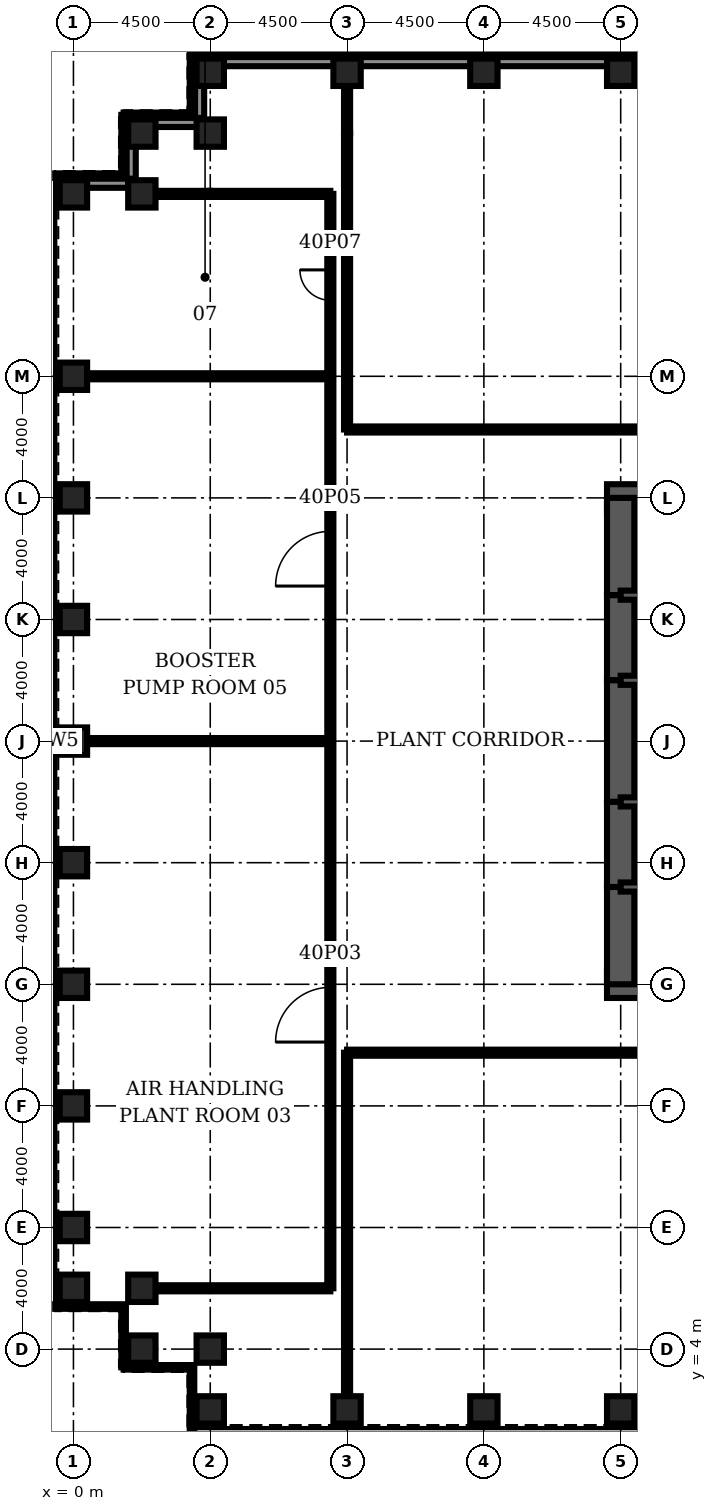
"""IFC4 building model, lengths in metres.
Left out: names, types, materials, properties, quantities, classifications, styles, units other than length and angle.
Written with IfcOpenShell. Run it as: python <this file> out.ifc"""

import sys

from ifc_helpers import new_model, si_unit, direction, frame, frame_2d, origin, origin_2d, place, context, subcontext, project, spatial, rectangle, hollow_rectangle, extrude, element, fill, save


model = new_model("IFC4")
c1 = context("Model", 3, precision=1e-05, world=origin(), true_north=direction((0.0, 1.0)))
c2 = subcontext(c1, "Body", "Model", "MODEL_VIEW")
j1 = project(units=[si_unit("LENGTHUNIT", "METRE"), si_unit("PLANEANGLEUNIT", "RADIAN")], contexts=[c1])
p1 = place(None, origin())
s1 = spatial("IfcSite", under=j1, at=p1, CompositionType="ELEMENT")
p2 = place(p1, origin())
s2 = spatial("IfcBuilding", under=s1, at=p2, CompositionType="ELEMENT")
p3 = place(p2, frame((0.0, 0.0, 180.3)))
s3 = spatial("IfcBuildingStorey", under=s2, at=p3, CompositionType="ELEMENT", Elevation=180.3)
for number, where, z_axis, x_axis in (
    (1, (4.5, 2.0, 0.0), (0.0, 0.0, 1.0), (0.0, 1.0, 0.0)),
    (2, (9.0, 2.0, 0.0), (0.0, 0.0, 1.0), (0.0, 1.0, 0.0)),
    (3, (13.5, 2.0, 0.0), (0.0, 0.0, 1.0), (0.0, 1.0, 0.0)),
    (4, (18.0, 2.0, 0.0), (0.0, 0.0, 1.0), (0.0, 1.0, 0.0)),
):
    element("IfcColumn", number, at=place(p3, frame(where, z_axis=z_axis, x_axis=x_axis)), inside=s3, PredefinedType="COLUMN", context=c2, shape_type="SweptSolid", body=[
        extrude(hollow_rectangle(XDim=0.9, YDim=0.9, WallThickness=0.09, at=origin_2d()), origin(), (0.0, 0.0, 1.0), 5.5),
    ])
for number, where, z_axis, x_axis in (
    (5, (18.0, 45.944, 0.155), (0.0, -0.342, 0.94), (0.0, 0.94, 0.342)),
    (6, (13.5, 45.944, 0.155), (0.0, -0.342, 0.94), (0.0, 0.94, 0.342)),
    (7, (9.0, 45.944, 0.155), (0.0, -0.342, 0.94), (0.0, 0.94, 0.342)),
    (8, (4.5, 45.944, 0.155), (0.0, -0.342, 0.94), (0.0, 0.94, 0.342)),
    (9, (4.5, 43.944, 0.155), (0.0, -0.342, 0.94), (0.0, 0.94, 0.342)),
    (10, (2.25, 43.944, 0.155), (0.0, -0.342, 0.94), (1.0, 0.0, 0.0)),
    (11, (2.25, 41.944, 0.155), (0.0, -0.342, 0.94), (1.0, 0.0, 0.0)),
    (12, (0.0, 41.944, 0.155), (0.0, -0.342, 0.94), (1.0, 0.0, 0.0)),
):
    element("IfcColumn", number, at=place(p3, frame(where, z_axis=z_axis, x_axis=x_axis)), inside=s3, PredefinedType="USERDEFINED", context=c2, shape_type="SweptSolid", body=[
        extrude(hollow_rectangle(XDim=0.9, YDim=0.9, WallThickness=0.09, at=origin_2d()), origin(), (0.0, 0.0, 1.0), 5.522),
    ])
for number, where, z_axis, x_axis in (
    (13, (0.0, 36.0, 0.0), (0.0, 0.0, 1.0), (1.0, 0.0, 0.0)),
    (14, (0.0, 32.0, 0.0), (0.0, 0.0, 1.0), (1.0, 0.0, 0.0)),
    (15, (0.0, 28.0, 0.0), (0.0, 0.0, 1.0), (1.0, 0.0, 0.0)),
    (16, (0.0, 24.0, 0.0), (0.0, 0.0, 1.0), (1.0, 0.0, 0.0)),
    (17, (0.0, 20.0, 0.0), (0.0, 0.0, 1.0), (1.0, 0.0, 0.0)),
    (18, (0.0, 16.0, 0.0), (0.0, 0.0, 1.0), (1.0, 0.0, 0.0)),
    (19, (0.0, 12.0, 0.0), (0.0, 0.0, 1.0), (1.0, 0.0, 0.0)),
    (20, (0.0, 8.0, 0.0), (0.0, 0.0, 1.0), (1.0, 0.0, 0.0)),
    (21, (0.0, 6.0, 0.0), (0.0, 0.0, 1.0), (1.0, 0.0, 0.0)),
    (22, (2.25, 6.0, 0.0), (0.0, 0.0, 1.0), (1.0, 0.0, 0.0)),
    (23, (2.25, 4.0, 0.0), (0.0, 0.0, 1.0), (1.0, 0.0, 0.0)),
    (24, (4.5, 4.0, 0.0), (0.0, 0.0, 1.0), (0.0, 1.0, 0.0)),
):
    element("IfcColumn", number, at=place(p3, frame(where, z_axis=z_axis, x_axis=x_axis)), inside=s3, PredefinedType="COLUMN", context=c2, shape_type="SweptSolid", body=[
        extrude(hollow_rectangle(XDim=0.9, YDim=0.9, WallThickness=0.09, at=origin_2d()), origin(), (0.0, 0.0, 1.0), 5.5),
    ])
for number, where, z_axis, x_axis in (
    (25, (17.55, 16.0, 0.0), (0.0, 0.0, 1.0), (1.0, 0.0, 0.0)),
    (26, (27.0, 32.0, 0.0), (0.0, 0.0, 1.0), (-1.0, 0.0, 0.0)),
):
    element("IfcWall", number, at=place(p3, frame(where, z_axis=z_axis, x_axis=x_axis)), inside=s3, PredefinedType="SHEAR", context=c2, shape_type="SweptSolid", body=[
        extrude(rectangle(XDim=9.45, YDim=0.9, at=frame_2d((4.725, 0.0))), origin(), (0.0, 0.0, 1.0), 5.5),
    ])
p4 = place(p3, frame((18.0, 32.0, 0.0), z_axis=(0.0, 0.0, 1.0), x_axis=(0.0, -1.0, 0.0)))
e27 = element("IfcWall", 27, at=p4, inside=s3, PredefinedType="SHEAR", context=c2, shape_type="SweptSolid", body=[
    extrude(rectangle(XDim=3.2, YDim=0.9, at=frame_2d((1.6, 0.0))), origin(), (0.0, 0.0, 1.0), 5.5),
])
p5 = place(p3, frame((18.0, 28.8, 0.0), z_axis=(0.0, 0.0, 1.0), x_axis=(0.0, -1.0, 0.0)))
e28 = element("IfcWall", 28, at=p5, inside=s3, PredefinedType="SHEAR", context=c2, shape_type="SweptSolid", body=[
    extrude(rectangle(XDim=2.8, YDim=0.9, at=frame_2d((1.4, 0.0))), origin(), (0.0, 0.0, 1.0), 5.5),
])
p6 = place(p5, frame((0.4, 0.0, 0.0)))
e29 = element("IfcOpeningElement", 29, at=p6, cuts=e28, PredefinedType="OPENING", context=c2, shape_type="SweptSolid", body=[
    extrude(rectangle(XDim=1.8, YDim=2.1, at=frame_2d((0.9, 1.05))), frame((0.0, 0.46, 0.0), z_axis=(0.0, -1.0, 0.0), x_axis=(1.0, 0.0, 0.0)), (0.0, 0.0, 1.0), 0.92),
])
p7 = place(p3, frame((18.0, 26.0, 0.0), z_axis=(0.0, 0.0, 1.0), x_axis=(0.0, -1.0, 0.0)))
e30 = element("IfcWall", 30, at=p7, inside=s3, PredefinedType="SHEAR", context=c2, shape_type="SweptSolid", body=[
    extrude(rectangle(XDim=4.0, YDim=0.9, at=frame_2d((2.0, 0.0))), origin(), (0.0, 0.0, 1.0), 5.5),
])
p8 = place(p3, frame((18.0, 22.0, 0.0), z_axis=(0.0, 0.0, 1.0), x_axis=(0.0, -1.0, 0.0)))
e31 = element("IfcWall", 31, at=p8, inside=s3, PredefinedType="SHEAR", context=c2, shape_type="SweptSolid", body=[
    extrude(rectangle(XDim=2.8, YDim=0.9, at=frame_2d((1.4, 0.0))), origin(), (0.0, 0.0, 1.0), 5.5),
])
p9 = place(p8, frame((0.6, 0.0, 0.0)))
e32 = element("IfcOpeningElement", 32, at=p9, cuts=e31, PredefinedType="OPENING", context=c2, shape_type="SweptSolid", body=[
    extrude(rectangle(XDim=1.8, YDim=2.1, at=frame_2d((0.9, 1.05))), frame((0.0, 0.46, 0.0), z_axis=(0.0, -1.0, 0.0), x_axis=(1.0, 0.0, 0.0)), (0.0, 0.0, 1.0), 0.92),
])
p10 = place(p3, frame((18.0, 19.2, 0.0), z_axis=(0.0, 0.0, 1.0), x_axis=(0.0, -1.0, 0.0)))
e33 = element("IfcWall", 33, at=p10, inside=s3, PredefinedType="SHEAR", context=c2, shape_type="SweptSolid", body=[
    extrude(rectangle(XDim=3.2, YDim=0.9, at=frame_2d((1.6, 0.0))), origin(), (0.0, 0.0, 1.0), 5.5),
])
p11 = place(p3, frame((18.0, 19.2, 0.0), z_axis=(0.0, 0.0, 1.0), x_axis=(1.0, 0.0, 0.0)))
e34 = element("IfcWall", 34, at=p11, inside=s3, PredefinedType="SOLIDWALL", context=c2, shape_type="SweptSolid", body=[
    extrude(rectangle(XDim=9.0, YDim=0.3, at=frame_2d((4.5, 0.0))), origin(), (0.0, 0.0, 1.0), 5.5),
])
p12 = place(p11, frame((0.65, 0.0, 0.0)))
e35 = element("IfcOpeningElement", 35, at=p12, cuts=e34, PredefinedType="OPENING", context=c2, shape_type="SweptSolid", body=[
    extrude(rectangle(XDim=1.0, YDim=2.1, at=frame_2d((0.5, 1.05))), frame((0.0, 0.16, 0.0), z_axis=(0.0, -1.0, 0.0), x_axis=(1.0, 0.0, 0.0)), (0.0, 0.0, 1.0), 0.32),
])
p13 = place(p3, frame((18.0, 28.8, 0.0), z_axis=(0.0, 0.0, 1.0), x_axis=(1.0, 0.0, 0.0)))
e36 = element("IfcWall", 36, at=p13, inside=s3, PredefinedType="SOLIDWALL", context=c2, shape_type="SweptSolid", body=[
    extrude(rectangle(XDim=9.0, YDim=0.3, at=frame_2d((4.5, 0.0))), origin(), (0.0, 0.0, 1.0), 5.5),
])
p14 = place(p13, frame((0.65, 0.0, 0.0)))
e37 = element("IfcOpeningElement", 37, at=p14, cuts=e36, PredefinedType="OPENING", context=c2, shape_type="SweptSolid", body=[
    extrude(rectangle(XDim=1.0, YDim=2.1, at=frame_2d((0.5, 1.05))), frame((0.0, 0.16, 0.0), z_axis=(0.0, -1.0, 0.0), x_axis=(1.0, 0.0, 0.0)), (0.0, 0.0, 1.0), 0.32),
])
p15 = place(p3, frame((18.0, 22.0, 0.0), z_axis=(0.0, 0.0, 1.0), x_axis=(1.0, 0.0, 0.0)))
e38 = element("IfcWall", 38, at=p15, inside=s3, PredefinedType="SOLIDWALL", context=c2, shape_type="SweptSolid", body=[
    extrude(rectangle(XDim=6.0, YDim=0.3, at=frame_2d((3.0, 0.0))), origin(), (0.0, 0.0, 1.0), 5.5),
])
p16 = place(p15, frame((2.0, 0.0, 0.0)))
e39 = element("IfcOpeningElement", 39, at=p16, cuts=e38, PredefinedType="OPENING", context=c2, shape_type="SweptSolid", body=[
    extrude(rectangle(XDim=1.0, YDim=2.1, at=frame_2d((0.5, 1.05))), frame((0.0, 0.16, 0.0), z_axis=(0.0, -1.0, 0.0), x_axis=(1.0, 0.0, 0.0)), (0.0, 0.0, 1.0), 0.32),
])
p17 = place(p3, frame((18.0, 26.0, 0.0), z_axis=(0.0, 0.0, 1.0), x_axis=(1.0, 0.0, 0.0)))
e40 = element("IfcWall", 40, at=p17, inside=s3, PredefinedType="SOLIDWALL", context=c2, shape_type="SweptSolid", body=[
    extrude(rectangle(XDim=6.0, YDim=0.3, at=frame_2d((3.0, 0.0))), origin(), (0.0, 0.0, 1.0), 5.5),
])
p18 = place(p3, frame((2.7, 6.0, 0.0), z_axis=(0.0, 0.0, 1.0), x_axis=(1.0, 0.0, 0.0)))
e41 = element("IfcWall", 41, at=p18, inside=s3, PredefinedType="PARTITIONING", context=c2, shape_type="SweptSolid", body=[
    extrude(rectangle(XDim=5.75, YDim=0.2, at=frame_2d((2.875, 0.0))), origin(), (0.0, 0.0, 1.0), 5.34),
])
p19 = place(p3, frame((9.0, 13.75, 0.0), z_axis=(0.0, 0.0, 1.0), x_axis=(1.0, 0.0, 0.0)))
e42 = element("IfcWall", 42, at=p19, inside=s3, PredefinedType="PARTITIONING", context=c2, shape_type="SweptSolid", body=[
    extrude(rectangle(XDim=54.0, YDim=0.2, at=frame_2d((27.0, 0.0))), origin(), (0.0, 0.0, 1.0), 5.34),
])
p20 = place(p19, frame((26.1, 0.0, 0.0)))
e43 = element("IfcOpeningElement", 43, at=p20, cuts=e42, PredefinedType="OPENING", context=c2, shape_type="SweptSolid", body=[
    extrude(rectangle(XDim=1.8, YDim=2.1, at=frame_2d((0.9, 1.05))), frame((0.0, 0.11, 0.0), z_axis=(0.0, -1.0, 0.0), x_axis=(1.0, 0.0, 0.0)), (0.0, 0.0, 1.0), 0.22),
])
p21 = place(p3, frame((0.45, 24.0, 0.0), z_axis=(0.0, 0.0, 1.0), x_axis=(1.0, 0.0, 0.0)))
e44 = element("IfcWall", 44, at=p21, inside=s3, PredefinedType="PARTITIONING", context=c2, shape_type="SweptSolid", body=[
    extrude(rectangle(XDim=8.0, YDim=0.2, at=frame_2d((4.0, 0.0))), origin(), (0.0, 0.0, 1.0), 5.34),
])
p22 = place(p3, frame((9.0, 34.25, 0.0), z_axis=(0.0, 0.0, 1.0), x_axis=(1.0, 0.0, 0.0)))
e45 = element("IfcWall", 45, at=p22, inside=s3, PredefinedType="PARTITIONING", context=c2, shape_type="SweptSolid", body=[
    extrude(rectangle(XDim=54.0, YDim=0.2, at=frame_2d((27.0, 0.0))), origin(), (0.0, 0.0, 1.0), 5.34),
])
p23 = place(p22, frame((26.1, 0.0, 0.0)))
e46 = element("IfcOpeningElement", 46, at=p23, cuts=e45, PredefinedType="OPENING", context=c2, shape_type="SweptSolid", body=[
    extrude(rectangle(XDim=1.8, YDim=2.1, at=frame_2d((0.9, 1.05))), frame((0.0, 0.11, 0.0), z_axis=(0.0, -1.0, 0.0), x_axis=(1.0, 0.0, 0.0)), (0.0, 0.0, 1.0), 0.22),
])
p24 = place(p3, frame((0.45, 36.0, 0.0), z_axis=(0.0, 0.0, 1.0), x_axis=(1.0, 0.0, 0.0)))
e47 = element("IfcWall", 47, at=p24, inside=s3, PredefinedType="PARTITIONING", context=c2, shape_type="SweptSolid", body=[
    extrude(rectangle(XDim=8.0, YDim=0.2, at=frame_2d((4.0, 0.0))), origin(), (0.0, 0.0, 1.0), 5.34),
])
p25 = place(p3, frame((2.7, 42.0, 0.0), z_axis=(0.0, 0.0, 1.0), x_axis=(1.0, 0.0, 0.0)))
e48 = element("IfcWall", 48, at=p25, inside=s3, PredefinedType="PARTITIONING", context=c2, shape_type="SweptSolid", body=[
    extrude(rectangle(XDim=1.8, YDim=0.2, at=frame_2d((0.9, 0.0))), origin(), (0.0, 0.0, 1.0), 4.64),
])
p26 = place(p3, frame((4.5, 42.0, 0.0), z_axis=(0.0, 0.0, 1.0), x_axis=(1.0, 0.0, 0.0)))
e49 = element("IfcWall", 49, at=p26, inside=s3, PredefinedType="PARTITIONING", context=c2, shape_type="SweptSolid", body=[
    extrude(rectangle(XDim=3.95, YDim=0.2, at=frame_2d((1.975, 0.0))), origin(), (0.0, 0.0, 1.0), 5.34),
])
p27 = place(p3, frame((8.45, 6.0, 0.0), z_axis=(0.0, 0.0, 1.0), x_axis=(0.0, 1.0, 0.0)))
e50 = element("IfcWall", 50, at=p27, inside=s3, PredefinedType="PARTITIONING", context=c2, shape_type="SweptSolid", body=[
    extrude(rectangle(XDim=36.0, YDim=0.2, at=frame_2d((18.0, 0.0))), origin(), (0.0, 0.0, 1.0), 5.34),
])
p28 = place(p27, frame((8.1, 0.0, 0.0)))
e51 = element("IfcOpeningElement", 51, at=p28, cuts=e50, PredefinedType="OPENING", context=c2, shape_type="SweptSolid", body=[
    extrude(rectangle(XDim=1.8, YDim=2.1, at=frame_2d((0.9, 1.05))), frame((0.0, 0.11, 0.0), z_axis=(0.0, -1.0, 0.0), x_axis=(1.0, 0.0, 0.0)), (0.0, 0.0, 1.0), 0.22),
])
p29 = place(p27, frame((23.1, 0.0, 0.0)))
e52 = element("IfcOpeningElement", 52, at=p29, cuts=e50, PredefinedType="OPENING", context=c2, shape_type="SweptSolid", body=[
    extrude(rectangle(XDim=1.8, YDim=2.1, at=frame_2d((0.9, 1.05))), frame((0.0, 0.11, 0.0), z_axis=(0.0, -1.0, 0.0), x_axis=(1.0, 0.0, 0.0)), (0.0, 0.0, 1.0), 0.22),
])
p30 = place(p27, frame((32.5, 0.0, 0.0)))
e53 = element("IfcOpeningElement", 53, at=p30, cuts=e50, PredefinedType="OPENING", context=c2, shape_type="SweptSolid", body=[
    extrude(rectangle(XDim=1.0, YDim=2.1, at=frame_2d((0.5, 1.05))), frame((0.0, 0.11, 0.0), z_axis=(0.0, -1.0, 0.0), x_axis=(1.0, 0.0, 0.0)), (0.0, 0.0, 1.0), 0.22),
])
p31 = place(p3, frame((9.0, 2.45, 0.0), z_axis=(0.0, 0.0, 1.0), x_axis=(0.0, 1.0, 0.0)))
e54 = element("IfcWall", 54, at=p31, inside=s3, PredefinedType="PARTITIONING", context=c2, shape_type="SweptSolid", body=[
    extrude(rectangle(XDim=11.3, YDim=0.2, at=frame_2d((5.65, 0.0))), origin(), (0.0, 0.0, 1.0), 5.34),
])
p32 = place(p3, frame((9.0, 34.25, 0.0), z_axis=(0.0, 0.0, 1.0), x_axis=(0.0, 1.0, 0.0)))
e55 = element("IfcWall", 55, at=p32, inside=s3, PredefinedType="PARTITIONING", context=c2, shape_type="SweptSolid", body=[
    extrude(rectangle(XDim=9.75, YDim=0.2, at=frame_2d((4.875, 0.0))), origin(), (0.0, 0.0, 1.0), 5.25),
])
p33 = place(p3, frame((9.0, 44.0, 0.0), z_axis=(0.0, 0.0, 1.0), x_axis=(0.0, 1.0, 0.0)))
e56 = element("IfcWall", 56, at=p33, inside=s3, PredefinedType="PARTITIONING", context=c2, shape_type="SweptSolid", body=[
    extrude(rectangle(XDim=1.55, YDim=0.2, at=frame_2d((0.775, 0.0))), origin(), (0.0, 0.0, 1.0), 4.726),
])
p34 = place(p3, frame((3.9, 46.6, 0.0), z_axis=(0.0, 0.0, 1.0), x_axis=(0.0, -1.0, 0.0)))
e57 = element("IfcWall", 57, at=p34, inside=s3, PredefinedType="ELEMENTEDWALL", context=c2, shape_type="SweptSolid", body=[
    extrude(rectangle(XDim=2.0, YDim=0.15, at=frame_2d((1.0, 0.0))), origin(), (0.0, 0.0, 1.0), 5.34),
])
p35 = place(p3, frame((3.9, 44.6, 0.0), z_axis=(0.0, 0.0, 1.0), x_axis=(-1.0, 0.0, 0.0)))
e58 = element("IfcWall", 58, at=p35, inside=s3, PredefinedType="ELEMENTEDWALL", context=c2, shape_type="SweptSolid", body=[
    extrude(rectangle(XDim=2.25, YDim=0.15, at=frame_2d((1.125, 0.0))), origin(), (0.0, 0.0, 1.0), 5.34),
])
p36 = place(p3, frame((1.65, 44.6, 0.0), z_axis=(0.0, 0.0, 1.0), x_axis=(0.0, -1.0, 0.0)))
e59 = element("IfcWall", 59, at=p36, inside=s3, PredefinedType="ELEMENTEDWALL", context=c2, shape_type="SweptSolid", body=[
    extrude(rectangle(XDim=2.0, YDim=0.15, at=frame_2d((1.0, 0.0))), origin(), (0.0, 0.0, 1.0), 5.34),
])
for number, where, z_axis, x_axis in (
    (60, (1.65, 42.6, 0.0), (0.0, 0.0, 1.0), (-1.0, 0.0, 0.0)),
    (61, (-0.6, 5.4, 0.0), (0.0, 0.0, 1.0), (1.0, 0.0, 0.0)),
):
    element("IfcWall", number, at=place(p3, frame(where, z_axis=z_axis, x_axis=x_axis)), inside=s3, PredefinedType="ELEMENTEDWALL", context=c2, shape_type="SweptSolid", body=[
        extrude(rectangle(XDim=2.25, YDim=0.15, at=frame_2d((1.125, 0.0))), origin(), (0.0, 0.0, 1.0), 5.34),
    ])
p37 = place(p3, frame((1.65, 5.4, 0.0), z_axis=(0.0, 0.0, 1.0), x_axis=(0.0, -1.0, 0.0)))
e62 = element("IfcWall", 62, at=p37, inside=s3, PredefinedType="ELEMENTEDWALL", context=c2, shape_type="SweptSolid", body=[
    extrude(rectangle(XDim=2.0, YDim=0.15, at=frame_2d((1.0, 0.0))), origin(), (0.0, 0.0, 1.0), 5.34),
])
p38 = place(p3, frame((1.65, 3.4, 0.0), z_axis=(0.0, 0.0, 1.0), x_axis=(1.0, 0.0, 0.0)))
e63 = element("IfcWall", 63, at=p38, inside=s3, PredefinedType="ELEMENTEDWALL", context=c2, shape_type="SweptSolid", body=[
    extrude(rectangle(XDim=2.25, YDim=0.15, at=frame_2d((1.125, 0.0))), origin(), (0.0, 0.0, 1.0), 5.34),
])
p39 = place(p3, frame((3.9, 3.4, 0.0), z_axis=(0.0, 0.0, 1.0), x_axis=(0.0, -1.0, 0.0)))
e64 = element("IfcWall", 64, at=p39, inside=s3, PredefinedType="ELEMENTEDWALL", context=c2, shape_type="SweptSolid", body=[
    extrude(rectangle(XDim=2.0, YDim=0.15, at=frame_2d((1.0, 0.0))), origin(), (0.0, 0.0, 1.0), 5.34),
])
p40 = place(p3, frame((67.85, 46.35, 5.5), z_axis=(0.0, 0.0, 1.0), x_axis=(-1.0, 0.0, 0.0)))
e65 = element("IfcWall", 65, at=p40, inside=s3, PredefinedType="PARAPET", context=c2, shape_type="SweptSolid", body=[
    extrude(rectangle(XDim=63.7, YDim=0.3, at=frame_2d((31.85, 0.0))), origin(), (0.0, 0.0, 1.0), 1.1),
])
p41 = place(p3, frame((4.15, 46.35, 5.5), z_axis=(0.0, 0.0, 1.0), x_axis=(0.0, -1.0, 0.0)))
e66 = element("IfcWall", 66, at=p41, inside=s3, PredefinedType="PARAPET", context=c2, shape_type="SweptSolid", body=[
    extrude(rectangle(XDim=2.0, YDim=0.3, at=frame_2d((1.0, 0.0))), origin(), (0.0, 0.0, 1.0), 1.1),
])
p42 = place(p3, frame((4.15, 44.35, 5.5), z_axis=(0.0, 0.0, 1.0), x_axis=(-1.0, 0.0, 0.0)))
e67 = element("IfcWall", 67, at=p42, inside=s3, PredefinedType="PARAPET", context=c2, shape_type="SweptSolid", body=[
    extrude(rectangle(XDim=2.25, YDim=0.3, at=frame_2d((1.125, 0.0))), origin(), (0.0, 0.0, 1.0), 1.1),
])
p43 = place(p3, frame((1.9, 44.35, 5.5), z_axis=(0.0, 0.0, 1.0), x_axis=(0.0, -1.0, 0.0)))
e68 = element("IfcWall", 68, at=p43, inside=s3, PredefinedType="PARAPET", context=c2, shape_type="SweptSolid", body=[
    extrude(rectangle(XDim=2.0, YDim=0.3, at=frame_2d((1.0, 0.0))), origin(), (0.0, 0.0, 1.0), 1.1),
])
p44 = place(p3, frame((1.9, 42.35, 5.5), z_axis=(0.0, 0.0, 1.0), x_axis=(-1.0, 0.0, 0.0)))
e69 = element("IfcWall", 69, at=p44, inside=s3, PredefinedType="PARAPET", context=c2, shape_type="SweptSolid", body=[
    extrude(rectangle(XDim=2.25, YDim=0.3, at=frame_2d((1.125, 0.0))), origin(), (0.0, 0.0, 1.0), 1.1),
])
p45 = place(p28, origin())
e70 = element("IfcDoor", 70, at=p45, inside=s3, OperationType="SINGLE_SWING_LEFT", PredefinedType="DOOR", context=c2, shape_type="SweptSolid", body=[
    extrude(rectangle(XDim=1.8, YDim=2.1, at=frame_2d((0.9, 1.05))), frame((0.0, 0.025, 0.0), z_axis=(0.0, -1.0, 0.0), x_axis=(1.0, 0.0, 0.0)), (0.0, 0.0, 1.0), 0.05),
])
fill(e51, e70)
p46 = place(p29, origin())
e71 = element("IfcDoor", 71, at=p46, inside=s3, OperationType="SINGLE_SWING_LEFT", PredefinedType="DOOR", context=c2, shape_type="SweptSolid", body=[
    extrude(rectangle(XDim=1.8, YDim=2.1, at=frame_2d((0.9, 1.05))), frame((0.0, 0.025, 0.0), z_axis=(0.0, -1.0, 0.0), x_axis=(1.0, 0.0, 0.0)), (0.0, 0.0, 1.0), 0.05),
])
fill(e52, e71)
p47 = place(p30, origin())
e72 = element("IfcDoor", 72, at=p47, inside=s3, OperationType="SINGLE_SWING_RIGHT", PredefinedType="DOOR", context=c2, shape_type="SweptSolid", body=[
    extrude(rectangle(XDim=1.0, YDim=2.1, at=frame_2d((0.5, 1.05))), frame((0.0, 0.025, 0.0), z_axis=(0.0, -1.0, 0.0), x_axis=(1.0, 0.0, 0.0)), (0.0, 0.0, 1.0), 0.05),
])
fill(e53, e72)
p48 = place(p9, origin())
e73 = element("IfcDoor", 73, at=p48, inside=s3, OperationType="SINGLE_SWING_LEFT", PredefinedType="DOOR", context=c2, shape_type="SweptSolid", body=[
    extrude(rectangle(XDim=1.8, YDim=2.1, at=frame_2d((0.9, 1.05))), frame((0.0, 0.45, 0.0), z_axis=(0.0, -1.0, 0.0), x_axis=(1.0, 0.0, 0.0)), (0.0, 0.0, 1.0), 0.899),
])
fill(e32, e73)
p49 = place(p6, origin())
e74 = element("IfcDoor", 74, at=p49, inside=s3, OperationType="SINGLE_SWING_LEFT", PredefinedType="DOOR", context=c2, shape_type="SweptSolid", body=[
    extrude(rectangle(XDim=1.8, YDim=2.1, at=frame_2d((0.9, 1.05))), frame((0.0, 0.45, 0.0), z_axis=(0.0, -1.0, 0.0), x_axis=(1.0, 0.0, 0.0)), (0.0, 0.0, 1.0), 0.899),
])
fill(e29, e74)
save(model, sys.argv[1])
